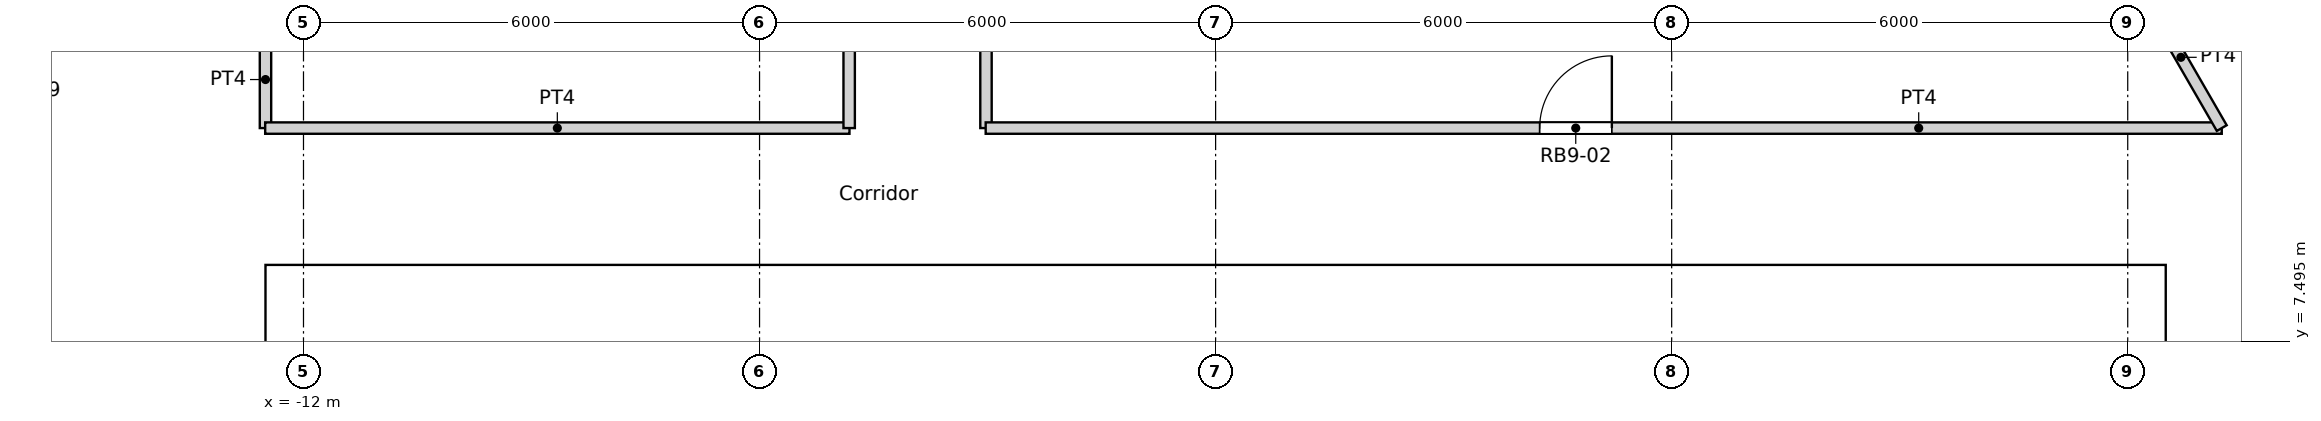
"""IFC4 building model, lengths in metres.
Left out: names, types, materials, properties, quantities, classifications, styles, units other than length and angle.
Written with IfcOpenShell. Run it as: python <this file> out.ifc"""

import sys

from ifc_helpers import new_model, si_unit, direction, frame, frame_2d, origin, place, context, subcontext, project, spatial, rectangle, extrude, element, fill, save


model = new_model("IFC4")
c1 = context("Model", 3, precision=1e-05, world=origin(), true_north=direction((0.0, 1.0)))
c2 = subcontext(c1, "Body", "Model", "MODEL_VIEW")
j1 = project(units=[si_unit("LENGTHUNIT", "METRE"), si_unit("PLANEANGLEUNIT", "RADIAN")], contexts=[c1])
p1 = place(None, origin())
s1 = spatial("IfcSite", under=j1, at=p1, CompositionType="ELEMENT")
p2 = place(p1, origin())
s2 = spatial("IfcBuilding", under=s1, at=p2, CompositionType="ELEMENT")
p3 = place(p2, frame((0.0, 0.0, 212.4)))
s3 = spatial("IfcBuildingStorey", under=s2, at=p3, CompositionType="ELEMENT", Elevation=212.4)
p4 = place(p3, frame((-12.5, 8.05, 0.0), z_axis=(0.0, 0.0, 1.0), x_axis=(1.0, 0.0, 0.0)))
e1 = element("IfcWall", 1, at=p4, inside=s3, PredefinedType="SOLIDWALL", context=c2, shape_type="SweptSolid", body=[
    extrude(rectangle(XDim=25.0, YDim=0.9, at=frame_2d((12.5, 0.0))), origin(), (0.0, 0.0, 1.0), 3.6),
])
p5 = place(p4, frame((8.3, 0.0, 0.0)))
e2 = element("IfcOpeningElement", 2, at=p5, cuts=e1, PredefinedType="OPENING", context=c2, shape_type="SweptSolid", body=[
    extrude(rectangle(XDim=1.8, YDim=2.1, at=frame_2d((0.9, 1.05))), frame((0.0, 0.45, 0.0), z_axis=(0.0, -1.0, 0.0), x_axis=(1.0, 0.0, 0.0)), (0.0, 0.0, 1.0), 0.9),
])
p6 = place(p3, frame((-12.05, -7.6, 0.0), z_axis=(0.0, 0.0, 1.0), x_axis=(0.0, 1.0, 0.0)))
e3 = element("IfcWall", 3, at=p6, inside=s3, PredefinedType="SOLIDWALL", context=c2, shape_type="SweptSolid", body=[
    extrude(rectangle(XDim=15.2, YDim=0.9, at=frame_2d((7.6, 0.0))), origin(), (0.0, 0.0, 1.0), 3.6),
])
p7 = place(p6, frame((7.1, 0.0, 0.0)))
e4 = element("IfcOpeningElement", 4, at=p7, cuts=e3, PredefinedType="OPENING", context=c2, shape_type="SweptSolid", body=[
    extrude(rectangle(XDim=1.0, YDim=2.1, at=frame_2d((0.5, 1.05))), frame((0.0, 0.45, 0.0), z_axis=(0.0, -1.0, 0.0), x_axis=(1.0, 0.0, 0.0)), (0.0, 0.0, 1.0), 0.9),
])
p8 = place(p3, frame((12.05, -7.6, 0.0), z_axis=(0.0, 0.0, 1.0), x_axis=(0.0, 1.0, 0.0)))
e5 = element("IfcWall", 5, at=p8, inside=s3, PredefinedType="SOLIDWALL", context=c2, shape_type="SweptSolid", body=[
    extrude(rectangle(XDim=15.2, YDim=0.9, at=frame_2d((7.6, 0.0))), origin(), (0.0, 0.0, 1.0), 3.6),
])
p9 = place(p8, frame((5.1, 0.0, 0.0)))
e6 = element("IfcOpeningElement", 6, at=p9, cuts=e5, PredefinedType="OPENING", context=c2, shape_type="SweptSolid", body=[
    extrude(rectangle(XDim=1.0, YDim=2.1, at=frame_2d((0.5, 1.05))), frame((0.0, 0.45, 0.0), z_axis=(0.0, -1.0, 0.0), x_axis=(1.0, 0.0, 0.0)), (0.0, 0.0, 1.0), 0.9),
])
for number, where, z_axis, x_axis in (
    (7, (-2.25, 3.25, 0.0), (0.0, 0.0, 1.0), (0.0, 1.0, 0.0)),
    (8, (0.55, 3.25, 0.0), (0.0, 0.0, 1.0), (0.0, 1.0, 0.0)),
):
    element("IfcWall", number, at=place(p3, frame(where, z_axis=z_axis, x_axis=x_axis)), inside=s3, PredefinedType="SOLIDWALL", context=c2, shape_type="SweptSolid", body=[
        extrude(rectangle(XDim=4.35, YDim=0.3, at=frame_2d((2.175, 0.0))), origin(), (0.0, 0.0, 1.0), 3.3),
    ])
p10 = place(p3, frame((-9.05, -7.0, 0.0), z_axis=(0.0, 0.0, 1.0), x_axis=(0.0, 1.0, 0.0)))
e9 = element("IfcWall", 9, at=p10, inside=s3, PredefinedType="SOLIDWALL", context=c2, shape_type="SweptSolid", body=[
    extrude(rectangle(XDim=14.6, YDim=0.3, at=frame_2d((7.3, 0.0))), origin(), (0.0, 0.0, 1.0), 3.3),
])
p11 = place(p3, frame((-4.275, 6.7, 0.0), z_axis=(0.0, 0.0, 1.0), x_axis=(0.0, 1.0, 0.0)))
e10 = element("IfcWall", 10, at=p11, inside=s3, PredefinedType="SOLIDWALL", context=c2, shape_type="SweptSolid", body=[
    extrude(rectangle(XDim=0.9, YDim=0.15, at=frame_2d((0.45, 0.0))), origin(), (0.0, 0.0, 1.0), 3.3),
])
p12 = place(p3, frame((0.7, 7.15, 0.0), z_axis=(0.0, 0.0, 1.0), x_axis=(1.0, 0.0, 0.0)))
e11 = element("IfcWall", 11, at=p12, inside=s3, PredefinedType="SOLIDWALL", context=c2, shape_type="SweptSolid", body=[
    extrude(rectangle(XDim=8.35, YDim=0.9, at=frame_2d((4.175, 0.0))), origin(), (0.0, 0.0, 1.0), 3.3),
])
p13 = place(p3, frame((-12.504, 10.3, 0.0), z_axis=(0.0, 0.0, 1.0), x_axis=(1.0, 0.0, 0.0)))
e12 = element("IfcWall", 12, at=p13, inside=s3, PredefinedType="PARTITIONING", context=c2, shape_type="SweptSolid", body=[
    extrude(rectangle(XDim=7.687, YDim=0.15, at=frame_2d((3.844, 0.0))), origin(), (0.0, 0.0, 1.0), 3.15),
])
p14 = place(p3, frame((-3.025, 10.3, 0.0), z_axis=(0.0, 0.0, 1.0), x_axis=(1.0, 0.0, 0.0)))
e13 = element("IfcWall", 13, at=p14, inside=s3, PredefinedType="PARTITIONING", context=c2, shape_type="SweptSolid", body=[
    extrude(rectangle(XDim=16.262, YDim=0.15, at=frame_2d((8.131, 0.0))), origin(), (0.0, 0.0, 1.0), 3.15),
])
p15 = place(p14, frame((7.288, 0.0, 0.0)))
e14 = element("IfcOpeningElement", 14, at=p15, cuts=e13, PredefinedType="OPENING", context=c2, shape_type="SweptSolid", body=[
    extrude(rectangle(XDim=0.95, YDim=2.1, at=frame_2d((0.475, 1.05))), frame((0.0, 0.075, 0.0), z_axis=(0.0, -1.0, 0.0), x_axis=(1.0, 0.0, 0.0)), (0.0, 0.0, 1.0), 0.15),
])
p16 = place(p3, frame((12.162, 12.162, 0.0), z_axis=(0.0, 0.0, 1.0), x_axis=(0.499961633463, -0.866047553582, 0.0)))
e15 = element("IfcWall", 15, at=p16, inside=s3, PredefinedType="PARTITIONING", context=c2, shape_type="SweptSolid", body=[
    extrude(rectangle(XDim=2.15, YDim=0.15, at=frame_2d((1.075, 0.0))), origin(), (0.0, 0.0, 1.0), 3.15),
])
p17 = place(p3, frame((-4.821, 10.3, 0.0), z_axis=(0.0, 0.0, 1.0), x_axis=(0.0, 1.0, 0.0)))
e16 = element("IfcWall", 16, at=p17, inside=s3, PredefinedType="PARTITIONING", context=c2, shape_type="SweptSolid", body=[
    extrude(rectangle(XDim=6.101, YDim=0.15, at=frame_2d((3.05, 0.0))), origin(), (0.0, 0.0, 1.0), 3.15),
])
p18 = place(p3, frame((-3.021, 10.3, 0.0), z_axis=(0.0, 0.0, 1.0), x_axis=(0.0, 1.0, 0.0)))
e17 = element("IfcWall", 17, at=p18, inside=s3, PredefinedType="PARTITIONING", context=c2, shape_type="SweptSolid", body=[
    extrude(rectangle(XDim=6.314, YDim=0.15, at=frame_2d((3.157, 0.0))), origin(), (0.0, 0.0, 1.0), 3.15),
])
p19 = place(p3, frame((-12.5, 10.3, 0.0), z_axis=(0.0, 0.0, 1.0), x_axis=(0.0, 1.0, 0.0)))
e18 = element("IfcWall", 18, at=p19, inside=s3, PredefinedType="PARTITIONING", context=c2, shape_type="SweptSolid", body=[
    extrude(rectangle(XDim=1.277, YDim=0.15, at=frame_2d((0.638, 0.0))), origin(), (0.0, 0.0, 1.0), 3.15),
])
p20 = place(p3, frame((-18.688, 6.802, 0.0), z_axis=(0.0, 0.0, 1.0), x_axis=(0.499914202267, 0.866074933462, 0.0)))
e19 = element("IfcWall", 19, at=p20, inside=s3, PredefinedType="PARTITIONING", context=c2, shape_type="SweptSolid", body=[
    extrude(rectangle(XDim=6.907, YDim=0.15, at=frame_2d((3.454, 0.0))), origin(), (0.0, 0.0, 1.0), 3.15),
])
p21 = place(p20, frame((3.857, 0.0, 0.0)))
e20 = element("IfcOpeningElement", 20, at=p21, cuts=e19, PredefinedType="OPENING", context=c2, shape_type="SweptSolid", body=[
    extrude(rectangle(XDim=1.5, YDim=2.1, at=frame_2d((0.75, 1.05))), frame((0.0, 0.075, 0.0), z_axis=(0.0, -1.0, 0.0), x_axis=(1.0, 0.0, 0.0)), (0.0, 0.0, 1.0), 0.15),
])
p22 = place(p5, origin())
e21 = element("IfcDoor", 21, at=p22, inside=s3, OperationType="DOUBLE_DOOR_SINGLE_SWING", PredefinedType="DOOR", context=c2, shape_type="SweptSolid", body=[
    extrude(rectangle(XDim=1.8, YDim=2.1, at=frame_2d((0.9, 1.05))), frame((0.0, 0.025, 0.0), z_axis=(0.0, -1.0, 0.0), x_axis=(1.0, 0.0, 0.0)), (0.0, 0.0, 1.0), 0.05),
])
fill(e2, e21)
p23 = place(p15, origin())
e22 = element("IfcDoor", 22, at=p23, inside=s3, OperationType="SINGLE_SWING_RIGHT", PredefinedType="DOOR", context=c2, shape_type="SweptSolid", body=[
    extrude(rectangle(XDim=0.95, YDim=2.1, at=frame_2d((0.475, 1.05))), frame((0.0, 0.025, 0.0), z_axis=(0.0, -1.0, 0.0), x_axis=(1.0, 0.0, 0.0)), (0.0, 0.0, 1.0), 0.05),
])
fill(e14, e22)
save(model, sys.argv[1])
